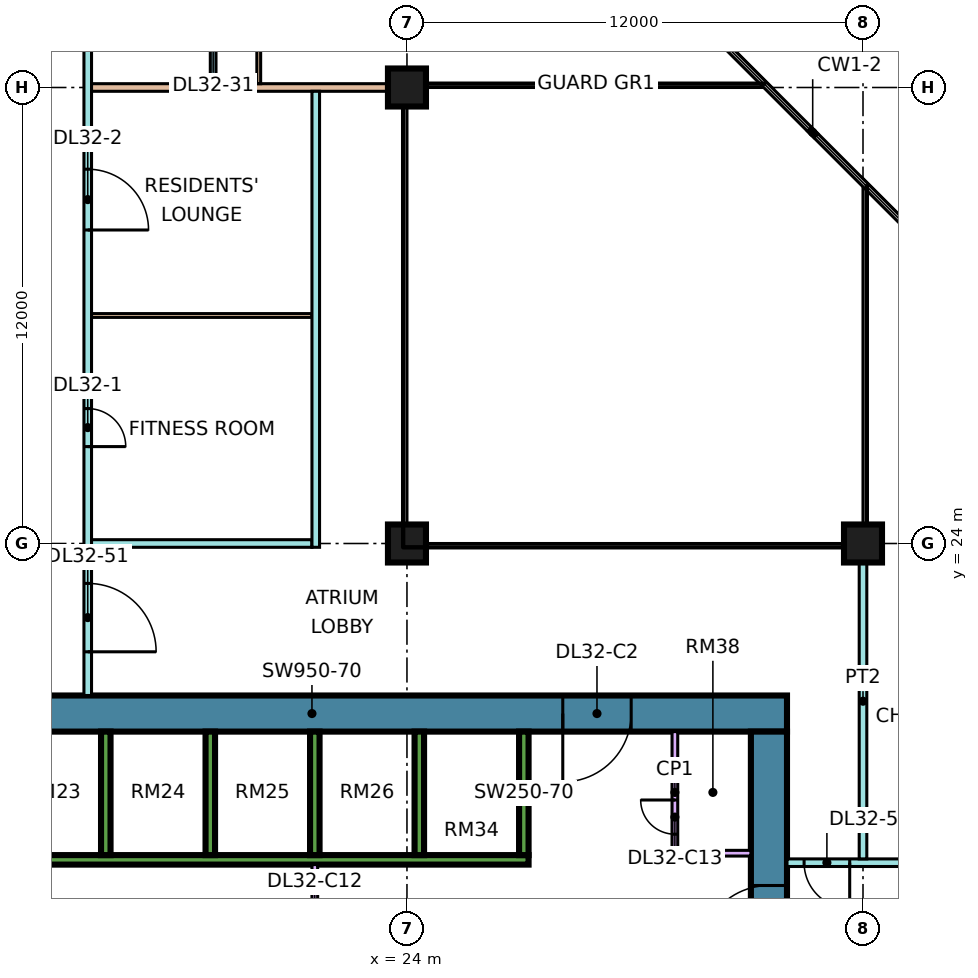
"""IFC4 building model, lengths in metres.
Left out: names, types, materials, properties, quantities, classifications, styles, units other than length and angle.
Written with IfcOpenShell. Run it as: python <this file> out.ifc"""

import sys

from ifc_helpers import new_model, si_unit, direction, frame, frame_2d, origin, origin_2d, place, context, subcontext, project, spatial, rectangle, extrude, element, fill, save


model = new_model("IFC4")
c1 = context("Model", 3, precision=1e-05, world=origin(), true_north=direction((0.0, 1.0)))
c2 = subcontext(c1, "Body", "Model", "MODEL_VIEW")
j1 = project(units=[si_unit("LENGTHUNIT", "METRE"), si_unit("PLANEANGLEUNIT", "RADIAN")], contexts=[c1])
p1 = place(None, origin())
s1 = spatial("IfcSite", under=j1, at=p1, CompositionType="ELEMENT")
p2 = place(p1, origin())
s2 = spatial("IfcBuilding", under=s1, at=p2, CompositionType="ELEMENT")
p3 = place(p2, frame((0.0, 0.0, 136.9)))
s3 = spatial("IfcBuildingStorey", under=s2, at=p3, CompositionType="ELEMENT", Elevation=136.9)
for number, where, z_axis, x_axis in (
    (1, (24.0, 24.0, 0.0), (0.0, 0.0, 1.0), (1.0, 0.0, 0.0)),
    (2, (24.0, 36.0, 0.0), (0.0, 0.0, 1.0), (1.0, 0.0, 0.0)),
    (3, (36.0, 24.0, 0.0), (0.0, 0.0, 1.0), (1.0, 0.0, 0.0)),
):
    element("IfcColumn", number, at=place(p3, frame(where, z_axis=z_axis, x_axis=x_axis)), inside=s3, PredefinedType="COLUMN", context=c2, shape_type="SweptSolid", body=[
        extrude(rectangle(XDim=1.0, YDim=1.0, at=origin_2d()), origin(), (0.0, 0.0, 1.0), 3.75),
    ])
p4 = place(p3, frame((9.0, 19.525, 0.0), z_axis=(0.0, 0.0, 1.0), x_axis=(1.0, 0.0, 0.0)))
e4 = element("IfcWall", 4, at=p4, inside=s3, PredefinedType="SHEAR", context=c2, shape_type="SweptSolid", body=[
    extrude(rectangle(XDim=25.0, YDim=0.95, at=frame_2d((12.5, 0.0))), origin(), (0.0, 0.0, 1.0), 3.75),
])
p5 = place(p4, frame((19.1, 0.0, 0.0)))
e5 = element("IfcOpeningElement", 5, at=p5, cuts=e4, PredefinedType="OPENING", context=c2, shape_type="SweptSolid", body=[
    extrude(rectangle(XDim=1.8, YDim=2.4, at=frame_2d((0.9, 1.2))), frame((0.0, 0.485, 0.0), z_axis=(0.0, -1.0, 0.0), x_axis=(1.0, 0.0, 0.0)), (0.0, 0.0, 1.0), 0.97),
])
p6 = place(p3, frame((33.525, 7.95, 0.0), z_axis=(0.0, 0.0, 1.0), x_axis=(0.0, 1.0, 0.0)))
e6 = element("IfcWall", 6, at=p6, inside=s3, PredefinedType="SHEAR", context=c2, shape_type="SweptSolid", body=[
    extrude(rectangle(XDim=11.1, YDim=0.95, at=frame_2d((5.55, 0.0))), origin(), (0.0, 0.0, 1.0), 3.75),
])
p7 = place(p6, frame((5.25, 0.0, 0.0)))
e7 = element("IfcOpeningElement", 7, at=p7, cuts=e6, PredefinedType="OPENING", context=c2, shape_type="SweptSolid", body=[
    extrude(rectangle(XDim=1.8, YDim=2.4, at=frame_2d((0.9, 1.2))), frame((0.0, 0.485, 0.0), z_axis=(0.0, -1.0, 0.0), x_axis=(1.0, 0.0, 0.0)), (0.0, 0.0, 1.0), 0.97),
])
p8 = place(p3, frame((13.45, 15.675, 0.0), z_axis=(0.0, 0.0, 1.0), x_axis=(1.0, 0.0, 0.0)))
e8 = element("IfcWall", 8, at=p8, inside=s3, PredefinedType="SHEAR", context=c2, shape_type="SweptSolid", body=[
    extrude(rectangle(XDim=13.75, YDim=0.25, at=frame_2d((6.875, 0.0))), origin(), (0.0, 0.0, 1.0), 3.75),
])
for number, where, z_axis, x_axis in (
    (9, (16.075, 15.8, 0.0), (0.0, 0.0, 1.0), (0.0, 1.0, 0.0)),
    (10, (18.825, 15.8, 0.0), (0.0, 0.0, 1.0), (0.0, 1.0, 0.0)),
    (11, (21.575, 15.8, 0.0), (0.0, 0.0, 1.0), (0.0, 1.0, 0.0)),
    (12, (24.325, 15.8, 0.0), (0.0, 0.0, 1.0), (0.0, 1.0, 0.0)),
    (13, (27.075, 15.8, 0.0), (0.0, 0.0, 1.0), (0.0, 1.0, 0.0)),
):
    element("IfcWall", number, at=place(p3, frame(where, z_axis=z_axis, x_axis=x_axis)), inside=s3, PredefinedType="SHEAR", context=c2, shape_type="SweptSolid", body=[
        extrude(rectangle(XDim=3.25, YDim=0.25, at=frame_2d((1.625, 0.0))), origin(), (0.0, 0.0, 1.0), 3.75),
    ])
p9 = place(p3, frame((21.575, 11.45, 0.0), z_axis=(0.0, 0.0, 1.0), x_axis=(0.0, 1.0, 0.0)))
e14 = element("IfcWall", 14, at=p9, inside=s3, PredefinedType="PARTITIONING", context=c2, shape_type="SweptSolid", body=[
    extrude(rectangle(XDim=4.1, YDim=0.15, at=frame_2d((2.05, 0.0))), origin(), (0.0, 0.0, 1.0), 3.3),
])
p10 = place(p9, frame((1.15, 0.0, 0.0)))
e15 = element("IfcOpeningElement", 15, at=p10, cuts=e14, PredefinedType="OPENING", context=c2, shape_type="SweptSolid", body=[
    extrude(rectangle(XDim=1.8, YDim=2.4, at=frame_2d((0.9, 1.2))), frame((0.0, 0.085, 0.0), z_axis=(0.0, -1.0, 0.0), x_axis=(1.0, 0.0, 0.0)), (0.0, 0.0, 1.0), 0.17),
])
p11 = place(p3, frame((31.05, 15.85, 0.0), z_axis=(0.0, 0.0, 1.0), x_axis=(0.0, 1.0, 0.0)))
e16 = element("IfcWall", 16, at=p11, inside=s3, PredefinedType="PARTITIONING", context=c2, shape_type="SweptSolid", body=[
    extrude(rectangle(XDim=3.2, YDim=0.15, at=frame_2d((1.6, 0.0))), origin(), (0.0, 0.0, 1.0), 3.3),
])
p12 = place(p11, frame((0.5, 0.0, 0.0)))
e17 = element("IfcOpeningElement", 17, at=p12, cuts=e16, PredefinedType="OPENING", context=c2, shape_type="SweptSolid", body=[
    extrude(rectangle(XDim=0.9, YDim=2.1, at=frame_2d((0.45, 1.05))), frame((0.0, 0.085, 0.0), z_axis=(0.0, -1.0, 0.0), x_axis=(1.0, 0.0, 0.0)), (0.0, 0.0, 1.0), 0.17),
])
p13 = place(p3, frame((31.05, 15.85, 0.0), z_axis=(0.0, 0.0, 1.0), x_axis=(1.0, 0.0, 0.0)))
e18 = element("IfcWall", 18, at=p13, inside=s3, PredefinedType="PARTITIONING", context=c2, shape_type="SweptSolid", body=[
    extrude(rectangle(XDim=2.0, YDim=0.15, at=frame_2d((1.0, 0.0))), origin(), (0.0, 0.0, 1.0), 3.3),
])
p14 = place(p3, frame((15.6, 20.0, 0.0), z_axis=(0.0, 0.0, 1.0), x_axis=(0.0, 1.0, 0.0)))
e19 = element("IfcWall", 19, at=p14, inside=s3, PredefinedType="PARTITIONING", context=c2, shape_type="SweptSolid", body=[
    extrude(rectangle(XDim=27.775, YDim=0.2, at=frame_2d((13.887, 0.0))), origin(), (0.0, 0.0, 1.0), 3.3),
])
p15 = place(p14, frame((6.55, 0.0, 0.0)))
e20 = element("IfcOpeningElement", 20, at=p15, cuts=e19, PredefinedType="OPENING", context=c2, shape_type="SweptSolid", body=[
    extrude(rectangle(XDim=1.0, YDim=2.1, at=frame_2d((0.5, 1.05))), frame((0.0, 0.11, 0.0), z_axis=(0.0, -1.0, 0.0), x_axis=(1.0, 0.0, 0.0)), (0.0, 0.0, 1.0), 0.22),
])
p16 = place(p14, frame((12.25, 0.0, 0.0)))
e21 = element("IfcOpeningElement", 21, at=p16, cuts=e19, PredefinedType="OPENING", context=c2, shape_type="SweptSolid", body=[
    extrude(rectangle(XDim=1.6, YDim=2.1, at=frame_2d((0.8, 1.05))), frame((0.0, 0.11, 0.0), z_axis=(0.0, -1.0, 0.0), x_axis=(1.0, 0.0, 0.0)), (0.0, 0.0, 1.0), 0.22),
])
p17 = place(p14, frame((23.35, 0.0, 0.0)))
e22 = element("IfcOpeningElement", 22, at=p17, cuts=e19, PredefinedType="OPENING", context=c2, shape_type="SweptSolid", body=[
    extrude(rectangle(XDim=1.0, YDim=2.1, at=frame_2d((0.5, 1.05))), frame((0.0, 0.11, 0.0), z_axis=(0.0, -1.0, 0.0), x_axis=(1.0, 0.0, 0.0)), (0.0, 0.0, 1.0), 0.22),
])
p18 = place(p14, frame((1.15, 0.0, 0.0)))
e23 = element("IfcOpeningElement", 23, at=p18, cuts=e19, PredefinedType="OPENING", context=c2, shape_type="SweptSolid", body=[
    extrude(rectangle(XDim=1.8, YDim=2.1, at=frame_2d((0.9, 1.05))), frame((0.0, 0.11, 0.0), z_axis=(0.0, -1.0, 0.0), x_axis=(1.0, 0.0, 0.0)), (0.0, 0.0, 1.0), 0.22),
])
p19 = place(p14, frame((25.9, 0.0, 0.0)))
e24 = element("IfcOpeningElement", 24, at=p19, cuts=e19, PredefinedType="OPENING", context=c2, shape_type="SweptSolid", body=[
    extrude(rectangle(XDim=1.0, YDim=2.1, at=frame_2d((0.5, 1.05))), frame((0.0, 0.11, 0.0), z_axis=(0.0, -1.0, 0.0), x_axis=(1.0, 0.0, 0.0)), (0.0, 0.0, 1.0), 0.22),
])
p20 = place(p3, frame((15.7, 24.0, 0.0), z_axis=(0.0, 0.0, 1.0), x_axis=(1.0, 0.0, 0.0)))
e25 = element("IfcWall", 25, at=p20, inside=s3, PredefinedType="PARTITIONING", context=c2, shape_type="SweptSolid", body=[
    extrude(rectangle(XDim=5.8, YDim=0.2, at=frame_2d((2.9, 0.0))), origin(), (0.0, 0.0, 1.0), 3.3),
])
p21 = place(p3, frame((15.7, 30.0, 0.0), z_axis=(0.0, 0.0, 1.0), x_axis=(1.0, 0.0, 0.0)))
e26 = element("IfcWall", 26, at=p21, inside=s3, PredefinedType="PARTITIONING", context=c2, shape_type="SweptSolid", body=[
    extrude(rectangle(XDim=5.8, YDim=0.1, at=frame_2d((2.9, 0.0))), origin(), (0.0, 0.0, 1.0), 3.3),
])
p22 = place(p3, frame((15.7, 36.0, 0.0), z_axis=(0.0, 0.0, 1.0), x_axis=(1.0, 0.0, 0.0)))
e27 = element("IfcWall", 27, at=p22, inside=s3, PredefinedType="PARTITIONING", context=c2, shape_type="SweptSolid", body=[
    extrude(rectangle(XDim=8.3, YDim=0.2, at=frame_2d((4.15, 0.0))), origin(), (0.0, 0.0, 1.0), 3.3),
])
p23 = place(p3, frame((18.9, 36.1, 0.0), z_axis=(0.0, 0.0, 1.0), x_axis=(0.0, 1.0, 0.0)))
e28 = element("IfcWall", 28, at=p23, inside=s3, PredefinedType="PARTITIONING", context=c2, shape_type="SweptSolid", body=[
    extrude(rectangle(XDim=6.575, YDim=0.15, at=frame_2d((3.288, 0.0))), origin(), (0.0, 0.0, 1.0), 3.3),
])
p24 = place(p23, frame((1.1, 0.0, 0.0)))
e29 = element("IfcOpeningElement", 29, at=p24, cuts=e28, PredefinedType="OPENING", context=c2, shape_type="SweptSolid", body=[
    extrude(rectangle(XDim=0.9, YDim=2.1, at=frame_2d((0.45, 1.05))), frame((0.0, 0.085, 0.0), z_axis=(0.0, -1.0, 0.0), x_axis=(1.0, 0.0, 0.0)), (0.0, 0.0, 1.0), 0.17),
])
p25 = place(p3, frame((20.1, 36.1, 0.0), z_axis=(0.0, 0.0, 1.0), x_axis=(0.0, 1.0, 0.0)))
e30 = element("IfcWall", 30, at=p25, inside=s3, PredefinedType="PARTITIONING", context=c2, shape_type="SweptSolid", body=[
    extrude(rectangle(XDim=5.95, YDim=0.1, at=frame_2d((2.975, 0.0))), origin(), (0.0, 0.0, 1.0), 3.3),
])
p26 = place(p25, frame((0.95, 0.0, 0.0)))
e31 = element("IfcOpeningElement", 31, at=p26, cuts=e30, PredefinedType="OPENING", context=c2, shape_type="SweptSolid", body=[
    extrude(rectangle(XDim=0.9, YDim=2.1, at=frame_2d((0.45, 1.05))), frame((0.0, 0.06, 0.0), z_axis=(0.0, -1.0, 0.0), x_axis=(1.0, 0.0, 0.0)), (0.0, 0.0, 1.0), 0.12),
])
p27 = place(p25, frame((3.95, 0.0, 0.0)))
e32 = element("IfcOpeningElement", 32, at=p27, cuts=e30, PredefinedType="OPENING", context=c2, shape_type="SweptSolid", body=[
    extrude(rectangle(XDim=0.9, YDim=2.1, at=frame_2d((0.45, 1.05))), frame((0.0, 0.06, 0.0), z_axis=(0.0, -1.0, 0.0), x_axis=(1.0, 0.0, 0.0)), (0.0, 0.0, 1.0), 0.12),
])
p28 = place(p3, frame((21.6, 23.9, 0.0), z_axis=(0.0, 0.0, 1.0), x_axis=(0.0, 1.0, 0.0)))
e33 = element("IfcWall", 33, at=p28, inside=s3, PredefinedType="PARTITIONING", context=c2, shape_type="SweptSolid", body=[
    extrude(rectangle(XDim=12.0, YDim=0.2, at=frame_2d((6.0, 0.0))), origin(), (0.0, 0.0, 1.0), 3.3),
])
p29 = place(p3, frame((34.0, 15.6, 0.0), z_axis=(0.0, 0.0, 1.0), x_axis=(1.0, 0.0, 0.0)))
e34 = element("IfcWall", 34, at=p29, inside=s3, PredefinedType="PARTITIONING", context=c2, shape_type="SweptSolid", body=[
    extrude(rectangle(XDim=10.35, YDim=0.2, at=frame_2d((5.175, 0.0))), origin(), (0.0, 0.0, 1.0), 3.3),
])
p30 = place(p29, frame((5.6, 0.0, 0.0)))
e35 = element("IfcOpeningElement", 35, at=p30, cuts=e34, PredefinedType="OPENING", context=c2, shape_type="SweptSolid", body=[
    extrude(rectangle(XDim=1.0, YDim=2.1, at=frame_2d((0.5, 1.05))), frame((0.0, 0.11, 0.0), z_axis=(0.0, -1.0, 0.0), x_axis=(1.0, 0.0, 0.0)), (0.0, 0.0, 1.0), 0.22),
])
p31 = place(p29, frame((0.45, 0.0, 0.0)))
e36 = element("IfcOpeningElement", 36, at=p31, cuts=e34, PredefinedType="OPENING", context=c2, shape_type="SweptSolid", body=[
    extrude(rectangle(XDim=1.2, YDim=2.1, at=frame_2d((0.6, 1.05))), frame((0.0, 0.11, 0.0), z_axis=(0.0, -1.0, 0.0), x_axis=(1.0, 0.0, 0.0)), (0.0, 0.0, 1.0), 0.22),
])
p32 = place(p3, frame((36.0, 15.7, 0.0), z_axis=(0.0, 0.0, 1.0), x_axis=(0.0, 1.0, 0.0)))
e37 = element("IfcWall", 37, at=p32, inside=s3, PredefinedType="PARTITIONING", context=c2, shape_type="SweptSolid", body=[
    extrude(rectangle(XDim=8.3, YDim=0.2, at=frame_2d((4.15, 0.0))), origin(), (0.0, 0.0, 1.0), 3.3),
])
p33 = place(p7, origin())
e38 = element("IfcDoor", 38, at=p33, inside=s3, OperationType="DOUBLE_DOOR_SINGLE_SWING", PredefinedType="DOOR", context=c2, shape_type="SweptSolid", body=[
    extrude(rectangle(XDim=1.8, YDim=2.4, at=frame_2d((0.9, 1.2))), frame((0.0, 0.025, 0.0), z_axis=(0.0, -1.0, 0.0), x_axis=(1.0, 0.0, 0.0)), (0.0, 0.0, 1.0), 0.05),
])
fill(e7, e38)
p34 = place(p5, frame((1.8, 0.0, 0.0), z_axis=(0.0, 0.0, 1.0), x_axis=(-1.0, 0.0, 0.0)))
e39 = element("IfcDoor", 39, at=p34, inside=s3, OperationType="DOUBLE_DOOR_SINGLE_SWING", PredefinedType="DOOR", context=c2, shape_type="SweptSolid", body=[
    extrude(rectangle(XDim=1.8, YDim=2.4, at=frame_2d((0.9, 1.2))), frame((0.0, 0.025, 0.0), z_axis=(0.0, -1.0, 0.0), x_axis=(1.0, 0.0, 0.0)), (0.0, 0.0, 1.0), 0.05),
])
fill(e5, e39)
p35 = place(p12, frame((0.9, 0.0, 0.0), z_axis=(0.0, 0.0, 1.0), x_axis=(-1.0, 0.0, 0.0)))
e40 = element("IfcDoor", 40, at=p35, inside=s3, OperationType="SINGLE_SWING_RIGHT", PredefinedType="DOOR", context=c2, shape_type="SweptSolid", body=[
    extrude(rectangle(XDim=0.9, YDim=2.1, at=frame_2d((0.45, 1.05))), frame((0.0, 0.025, 0.0), z_axis=(0.0, -1.0, 0.0), x_axis=(1.0, 0.0, 0.0)), (0.0, 0.0, 1.0), 0.05),
])
fill(e17, e40)
p36 = place(p15, frame((1.0, 0.0, 0.0), z_axis=(0.0, 0.0, 1.0), x_axis=(-1.0, 0.0, 0.0)))
e41 = element("IfcDoor", 41, at=p36, inside=s3, OperationType="SINGLE_SWING_LEFT", PredefinedType="DOOR", context=c2, shape_type="SweptSolid", body=[
    extrude(rectangle(XDim=1.0, YDim=2.1, at=frame_2d((0.5, 1.05))), frame((0.0, 0.025, 0.0), z_axis=(0.0, -1.0, 0.0), x_axis=(1.0, 0.0, 0.0)), (0.0, 0.0, 1.0), 0.05),
])
fill(e20, e41)
p37 = place(p16, frame((1.6, 0.0, 0.0), z_axis=(0.0, 0.0, 1.0), x_axis=(-1.0, 0.0, 0.0)))
e42 = element("IfcDoor", 42, at=p37, inside=s3, OperationType="DOUBLE_DOOR_SINGLE_SWING", PredefinedType="DOOR", context=c2, shape_type="SweptSolid", body=[
    extrude(rectangle(XDim=1.6, YDim=2.1, at=frame_2d((0.8, 1.05))), frame((0.0, 0.025, 0.0), z_axis=(0.0, -1.0, 0.0), x_axis=(1.0, 0.0, 0.0)), (0.0, 0.0, 1.0), 0.05),
])
fill(e21, e42)
p38 = place(p31, origin())
e43 = element("IfcDoor", 43, at=p38, inside=s3, OperationType="SINGLE_SWING_RIGHT", PredefinedType="DOOR", context=c2, shape_type="SweptSolid", body=[
    extrude(rectangle(XDim=1.2, YDim=2.1, at=frame_2d((0.6, 1.05))), frame((0.0, 0.025, 0.0), z_axis=(0.0, -1.0, 0.0), x_axis=(1.0, 0.0, 0.0)), (0.0, 0.0, 1.0), 0.05),
])
fill(e36, e43)
p39 = place(p18, frame((1.8, 0.0, 0.0), z_axis=(0.0, 0.0, 1.0), x_axis=(-1.0, 0.0, 0.0)))
e44 = element("IfcDoor", 44, at=p39, inside=s3, OperationType="DOUBLE_DOOR_SINGLE_SWING", PredefinedType="DOOR", context=c2, shape_type="SweptSolid", body=[
    extrude(rectangle(XDim=1.8, YDim=2.1, at=frame_2d((0.9, 1.05))), frame((0.0, 0.025, 0.0), z_axis=(0.0, -1.0, 0.0), x_axis=(1.0, 0.0, 0.0)), (0.0, 0.0, 1.0), 0.05),
])
fill(e23, e44)
save(model, sys.argv[1])
